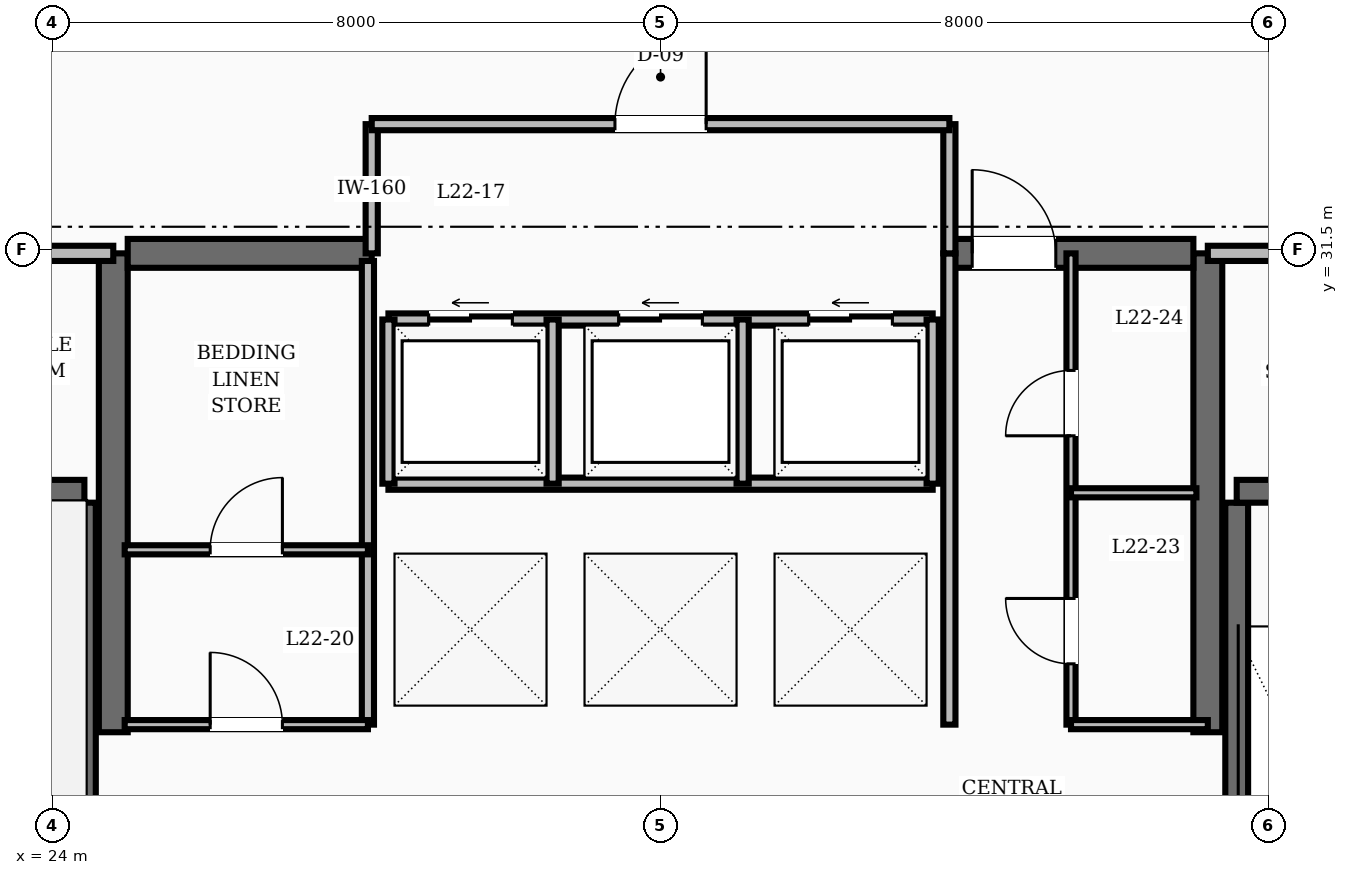
"""IFC4 building model, lengths in metres.
Left out: names, types, materials, properties, quantities, classifications, styles, units other than length and angle.
Written with IfcOpenShell. Run it as: python <this file> out.ifc"""

import sys

from ifc_helpers import new_model, si_unit, direction, frame, frame_2d, origin, place, context, subcontext, project, spatial, rectangle, extrude, element, fill, save


model = new_model("IFC4")
c1 = context("Model", 3, precision=1e-05, world=origin(), true_north=direction((0.0, 1.0)))
c2 = subcontext(c1, "Body", "Model", "MODEL_VIEW")
j1 = project(units=[si_unit("LENGTHUNIT", "METRE"), si_unit("PLANEANGLEUNIT", "RADIAN")], contexts=[c1])
p1 = place(None, origin())
s1 = spatial("IfcSite", under=j1, at=p1, CompositionType="ELEMENT")
p2 = place(p1, origin())
s2 = spatial("IfcBuilding", under=s1, at=p2, CompositionType="ELEMENT")
p3 = place(p2, frame((0.0, 0.0, 88.0)))
s3 = spatial("IfcBuildingStorey", under=s2, at=p3, CompositionType="ELEMENT", Elevation=88.0)
for number, where, z_axis, x_axis in (
    (1, (24.8, 25.15, 0.0), (0.0, 0.0, 1.0), (0.0, 1.0, 0.0)),
    (2, (39.2, 25.15, 0.0), (0.0, 0.0, 1.0), (0.0, 1.0, 0.0)),
):
    element("IfcWall", number, at=place(p3, frame(where, z_axis=z_axis, x_axis=x_axis)), inside=s3, PredefinedType="SHEAR", context=c2, shape_type="SweptSolid", body=[
        extrude(rectangle(XDim=6.3, YDim=0.38, at=frame_2d((3.15, 0.0))), origin(), (0.0, 0.0, 1.0), 3.6),
    ])
p4 = place(p3, frame((24.99, 31.45, 0.0), z_axis=(0.0, 0.0, 1.0), x_axis=(1.0, 0.0, 0.0)))
e3 = element("IfcWall", 3, at=p4, inside=s3, PredefinedType="SHEAR", context=c2, shape_type="SweptSolid", body=[
    extrude(rectangle(XDim=3.21, YDim=0.38, at=frame_2d((1.605, 0.0))), origin(), (0.0, 0.0, 1.0), 3.6),
])
p5 = place(p3, frame((35.8, 31.45, 0.0), z_axis=(0.0, 0.0, 1.0), x_axis=(1.0, 0.0, 0.0)))
e4 = element("IfcWall", 4, at=p5, inside=s3, PredefinedType="SHEAR", context=c2, shape_type="SweptSolid", body=[
    extrude(rectangle(XDim=3.21, YDim=0.38, at=frame_2d((1.605, 0.0))), origin(), (0.0, 0.0, 1.0), 3.6),
])
p6 = place(p5, frame((0.3, 0.0, 0.0)))
e5 = element("IfcOpeningElement", 5, at=p6, cuts=e4, PredefinedType="OPENING", context=c2, shape_type="SweptSolid", body=[
    extrude(rectangle(XDim=1.1, YDim=2.1, at=frame_2d((0.55, 1.05))), frame((0.0, 0.2, 0.0), z_axis=(0.0, -1.0, 0.0), x_axis=(1.0, 0.0, 0.0)), (0.0, 0.0, 1.0), 0.4),
])
p7 = place(p3, frame((24.42, 19.43, 0.0), z_axis=(0.0, 0.0, 1.0), x_axis=(0.0, 1.0, 0.0)))
e6 = element("IfcWall", 6, at=p7, inside=s3, PredefinedType="SHEAR", context=c2, shape_type="SweptSolid", body=[
    extrude(rectangle(XDim=8.74, YDim=0.3, at=frame_2d((4.37, 0.0))), origin(), (0.0, 0.0, 1.0), 3.6),
])
p8 = place(p3, frame((20.82, 28.32, 0.0), z_axis=(0.0, 0.0, 1.0), x_axis=(1.0, 0.0, 0.0)))
e7 = element("IfcWall", 7, at=p8, inside=s3, PredefinedType="SHEAR", context=c2, shape_type="SweptSolid", body=[
    extrude(rectangle(XDim=3.6, YDim=0.3, at=frame_2d((1.8, 0.0))), origin(), (0.0, 0.0, 1.0), 3.6),
])
p9 = place(p3, frame((39.58, 19.43, 0.0), z_axis=(0.0, 0.0, 1.0), x_axis=(0.0, 1.0, 0.0)))
e8 = element("IfcWall", 8, at=p9, inside=s3, PredefinedType="SHEAR", context=c2, shape_type="SweptSolid", body=[
    extrude(rectangle(XDim=8.74, YDim=0.3, at=frame_2d((4.37, 0.0))), origin(), (0.0, 0.0, 1.0), 3.6),
])
p10 = place(p3, frame((39.58, 28.32, 0.0), z_axis=(0.0, 0.0, 1.0), x_axis=(1.0, 0.0, 0.0)))
e9 = element("IfcWall", 9, at=p10, inside=s3, PredefinedType="SHEAR", context=c2, shape_type="SweptSolid", body=[
    extrude(rectangle(XDim=3.6, YDim=0.3, at=frame_2d((1.8, 0.0))), origin(), (0.0, 0.0, 1.0), 3.6),
])
p11 = place(p10, frame((1.3, 0.0, 0.0)))
e10 = element("IfcOpeningElement", 10, at=p11, cuts=e9, PredefinedType="OPENING", context=c2, shape_type="SweptSolid", body=[
    extrude(rectangle(XDim=1.1, YDim=2.1, at=frame_2d((0.55, 1.05))), frame((0.0, 0.16, 0.0), z_axis=(0.0, -1.0, 0.0), x_axis=(1.0, 0.0, 0.0)), (0.0, 0.0, 1.0), 0.32),
])
for number, where, z_axis, x_axis in (
    (11, (39.2, 31.45, 0.0), (0.0, 0.0, 1.0), (1.0, 0.0, 0.0)),
    (12, (20.82, 31.45, 0.0), (0.0, 0.0, 1.0), (1.0, 0.0, 0.0)),
):
    element("IfcWall", number, at=place(p3, frame(where, z_axis=z_axis, x_axis=x_axis)), inside=s3, PredefinedType="SOLIDWALL", context=c2, shape_type="SweptSolid", body=[
        extrude(rectangle(XDim=3.98, YDim=0.2, at=frame_2d((1.99, 0.0))), origin(), (0.0, 0.0, 1.0), 2.71),
    ])
p12 = place(p3, frame((35.8, 25.25, 0.0), z_axis=(0.0, 0.0, 1.0), x_axis=(0.0, 1.0, 0.0)))
e13 = element("IfcWall", 13, at=p12, inside=s3, PredefinedType="SOLIDWALL", context=c2, shape_type="SweptSolid", body=[
    extrude(rectangle(XDim=6.2, YDim=0.16, at=frame_2d((3.1, 0.0))), origin(), (0.0, 0.0, 1.0), 2.71),
])
p13 = place(p3, frame((28.42, 30.58, 0.0), z_axis=(0.0, 0.0, 1.0), x_axis=(1.0, 0.0, 0.0)))
e14 = element("IfcWall", 14, at=p13, inside=s3, PredefinedType="SOLIDWALL", context=c2, shape_type="SweptSolid", body=[
    extrude(rectangle(XDim=7.16, YDim=0.16, at=frame_2d((3.58, 0.0))), origin(), (0.0, 0.0, 1.0), 2.71),
])
p14 = place(p13, frame((0.53, 0.0, 0.0)))
e15 = element("IfcOpeningElement", 15, at=p14, cuts=e14, PredefinedType="OPENING", context=c2, shape_type="SweptSolid", body=[
    extrude(rectangle(XDim=1.1, YDim=2.15, at=frame_2d((0.55, 1.075))), frame((0.0, 0.09, 0.0), z_axis=(0.0, -1.0, 0.0), x_axis=(1.0, 0.0, 0.0)), (0.0, 0.0, 1.0), 0.18),
])
p15 = place(p13, frame((3.03, 0.0, 0.0)))
e16 = element("IfcOpeningElement", 16, at=p15, cuts=e14, PredefinedType="OPENING", context=c2, shape_type="SweptSolid", body=[
    extrude(rectangle(XDim=1.1, YDim=2.15, at=frame_2d((0.55, 1.075))), frame((0.0, 0.09, 0.0), z_axis=(0.0, -1.0, 0.0), x_axis=(1.0, 0.0, 0.0)), (0.0, 0.0, 1.0), 0.18),
])
p16 = place(p13, frame((5.53, 0.0, 0.0)))
e17 = element("IfcOpeningElement", 17, at=p16, cuts=e14, PredefinedType="OPENING", context=c2, shape_type="SweptSolid", body=[
    extrude(rectangle(XDim=1.1, YDim=2.15, at=frame_2d((0.55, 1.075))), frame((0.0, 0.09, 0.0), z_axis=(0.0, -1.0, 0.0), x_axis=(1.0, 0.0, 0.0)), (0.0, 0.0, 1.0), 0.18),
])
p17 = place(p3, frame((28.42, 28.42, 0.0), z_axis=(0.0, 0.0, 1.0), x_axis=(1.0, 0.0, 0.0)))
e18 = element("IfcWall", 18, at=p17, inside=s3, PredefinedType="SOLIDWALL", context=c2, shape_type="SweptSolid", body=[
    extrude(rectangle(XDim=7.16, YDim=0.16, at=frame_2d((3.58, 0.0))), origin(), (0.0, 0.0, 1.0), 2.71),
])
for number, where, z_axis, x_axis in (
    (19, (28.42, 28.42, 0.0), (0.0, 0.0, 1.0), (0.0, 1.0, 0.0)),
    (20, (30.58, 28.42, 0.0), (0.0, 0.0, 1.0), (0.0, 1.0, 0.0)),
    (21, (33.08, 28.42, 0.0), (0.0, 0.0, 1.0), (0.0, 1.0, 0.0)),
    (22, (35.58, 28.42, 0.0), (0.0, 0.0, 1.0), (0.0, 1.0, 0.0)),
):
    element("IfcWall", number, at=place(p3, frame(where, z_axis=z_axis, x_axis=x_axis)), inside=s3, PredefinedType="SOLIDWALL", context=c2, shape_type="SweptSolid", body=[
        extrude(rectangle(XDim=2.16, YDim=0.16, at=frame_2d((1.08, 0.0))), origin(), (0.0, 0.0, 1.0), 2.71),
    ])
for number, where, z_axis, x_axis in (
    (23, (28.2, 31.45, 0.0), (0.0, 0.0, 1.0), (0.0, 1.0, 0.0)),
    (24, (35.8, 31.45, 0.0), (0.0, 0.0, 1.0), (0.0, 1.0, 0.0)),
):
    element("IfcWall", number, at=place(p3, frame(where, z_axis=z_axis, x_axis=x_axis)), inside=s3, PredefinedType="SOLIDWALL", context=c2, shape_type="SweptSolid", body=[
        extrude(rectangle(XDim=1.7, YDim=0.16, at=frame_2d((0.85, 0.0))), origin(), (0.0, 0.0, 1.0), 2.71),
    ])
p18 = place(p3, frame((28.2, 33.15, 0.0), z_axis=(0.0, 0.0, 1.0), x_axis=(1.0, 0.0, 0.0)))
e25 = element("IfcWall", 25, at=p18, inside=s3, PredefinedType="SOLIDWALL", context=c2, shape_type="SweptSolid", body=[
    extrude(rectangle(XDim=7.6, YDim=0.16, at=frame_2d((3.8, 0.0))), origin(), (0.0, 0.0, 1.0), 2.71),
])
p19 = place(p18, frame((3.2, 0.0, 0.0)))
e26 = element("IfcOpeningElement", 26, at=p19, cuts=e25, PredefinedType="OPENING", context=c2, shape_type="SweptSolid", body=[
    extrude(rectangle(XDim=1.2, YDim=2.1, at=frame_2d((0.6, 1.05))), frame((0.0, 0.09, 0.0), z_axis=(0.0, -1.0, 0.0), x_axis=(1.0, 0.0, 0.0)), (0.0, 0.0, 1.0), 0.18),
])
p20 = place(p3, frame((28.15, 25.25, 0.0), z_axis=(0.0, 0.0, 1.0), x_axis=(0.0, 1.0, 0.0)))
e27 = element("IfcWall", 27, at=p20, inside=s3, PredefinedType="SOLIDWALL", context=c2, shape_type="SweptSolid", body=[
    extrude(rectangle(XDim=6.1, YDim=0.16, at=frame_2d((3.05, 0.0))), origin(), (0.0, 0.0, 1.0), 2.71),
])
p21 = place(p3, frame((24.95, 25.25, 0.0), z_axis=(0.0, 0.0, 1.0), x_axis=(1.0, 0.0, 0.0)))
e28 = element("IfcWall", 28, at=p21, inside=s3, PredefinedType="PARTITIONING", context=c2, shape_type="SweptSolid", body=[
    extrude(rectangle(XDim=3.2, YDim=0.12, at=frame_2d((1.6, 0.0))), origin(), (0.0, 0.0, 1.0), 2.71),
])
p22 = place(p21, frame((1.125, 0.0, 0.0)))
e29 = element("IfcOpeningElement", 29, at=p22, cuts=e28, PredefinedType="OPENING", context=c2, shape_type="SweptSolid", body=[
    extrude(rectangle(XDim=0.95, YDim=2.1, at=frame_2d((0.475, 1.05))), frame((0.0, 0.07, 0.0), z_axis=(0.0, -1.0, 0.0), x_axis=(1.0, 0.0, 0.0)), (0.0, 0.0, 1.0), 0.14),
])
p23 = place(p3, frame((37.4, 25.25, 0.0), z_axis=(0.0, 0.0, 1.0), x_axis=(0.0, 1.0, 0.0)))
e30 = element("IfcWall", 30, at=p23, inside=s3, PredefinedType="PARTITIONING", context=c2, shape_type="SweptSolid", body=[
    extrude(rectangle(XDim=6.2, YDim=0.12, at=frame_2d((3.1, 0.0))), origin(), (0.0, 0.0, 1.0), 2.71),
])
p24 = place(p23, frame((0.8, 0.0, 0.0)))
e31 = element("IfcOpeningElement", 31, at=p24, cuts=e30, PredefinedType="OPENING", context=c2, shape_type="SweptSolid", body=[
    extrude(rectangle(XDim=0.86, YDim=2.1, at=frame_2d((0.43, 1.05))), frame((0.0, 0.07, 0.0), z_axis=(0.0, -1.0, 0.0), x_axis=(1.0, 0.0, 0.0)), (0.0, 0.0, 1.0), 0.14),
])
p25 = place(p23, frame((3.8, 0.0, 0.0)))
e32 = element("IfcOpeningElement", 32, at=p25, cuts=e30, PredefinedType="OPENING", context=c2, shape_type="SweptSolid", body=[
    extrude(rectangle(XDim=0.86, YDim=2.1, at=frame_2d((0.43, 1.05))), frame((0.0, 0.07, 0.0), z_axis=(0.0, -1.0, 0.0), x_axis=(1.0, 0.0, 0.0)), (0.0, 0.0, 1.0), 0.14),
])
p26 = place(p3, frame((37.4, 25.25, 0.0), z_axis=(0.0, 0.0, 1.0), x_axis=(1.0, 0.0, 0.0)))
e33 = element("IfcWall", 33, at=p26, inside=s3, PredefinedType="PARTITIONING", context=c2, shape_type="SweptSolid", body=[
    extrude(rectangle(XDim=1.8, YDim=0.12, at=frame_2d((0.9, 0.0))), origin(), (0.0, 0.0, 1.0), 2.71),
])
p27 = place(p3, frame((24.95, 27.55, 0.0), z_axis=(0.0, 0.0, 1.0), x_axis=(1.0, 0.0, 0.0)))
e34 = element("IfcWall", 34, at=p27, inside=s3, PredefinedType="PARTITIONING", context=c2, shape_type="SweptSolid", body=[
    extrude(rectangle(XDim=3.2, YDim=0.12, at=frame_2d((1.6, 0.0))), origin(), (0.0, 0.0, 1.0), 2.71),
])
p28 = place(p27, frame((1.125, 0.0, 0.0)))
e35 = element("IfcOpeningElement", 35, at=p28, cuts=e34, PredefinedType="OPENING", context=c2, shape_type="SweptSolid", body=[
    extrude(rectangle(XDim=0.95, YDim=2.1, at=frame_2d((0.475, 1.05))), frame((0.0, 0.07, 0.0), z_axis=(0.0, -1.0, 0.0), x_axis=(1.0, 0.0, 0.0)), (0.0, 0.0, 1.0), 0.14),
])
p29 = place(p3, frame((37.4, 28.3, 0.0), z_axis=(0.0, 0.0, 1.0), x_axis=(1.0, 0.0, 0.0)))
e36 = element("IfcWall", 36, at=p29, inside=s3, PredefinedType="PARTITIONING", context=c2, shape_type="SweptSolid", body=[
    extrude(rectangle(XDim=1.65, YDim=0.12, at=frame_2d((0.825, 0.0))), origin(), (0.0, 0.0, 1.0), 2.71),
])
p30 = place(p6, origin())
e37 = element("IfcDoor", 37, at=p30, inside=s3, OperationType="SINGLE_SWING_LEFT", PredefinedType="DOOR", context=c2, shape_type="SweptSolid", body=[
    extrude(rectangle(XDim=1.1, YDim=2.1, at=frame_2d((0.55, 1.05))), frame((0.0, 0.025, 0.0), z_axis=(0.0, -1.0, 0.0), x_axis=(1.0, 0.0, 0.0)), (0.0, 0.0, 1.0), 0.05),
])
fill(e5, e37)
p31 = place(p14, origin())
e38 = element("IfcDoor", 38, at=p31, inside=s3, OperationType="SLIDING_TO_LEFT", PredefinedType="DOOR", context=c2, shape_type="SweptSolid", body=[
    extrude(rectangle(XDim=1.1, YDim=2.15, at=frame_2d((0.55, 1.075))), frame((0.0, 0.025, 0.0), z_axis=(0.0, -1.0, 0.0), x_axis=(1.0, 0.0, 0.0)), (0.0, 0.0, 1.0), 0.05),
])
fill(e15, e38)
p32 = place(p15, origin())
e39 = element("IfcDoor", 39, at=p32, inside=s3, OperationType="SLIDING_TO_LEFT", PredefinedType="DOOR", context=c2, shape_type="SweptSolid", body=[
    extrude(rectangle(XDim=1.1, YDim=2.15, at=frame_2d((0.55, 1.075))), frame((0.0, 0.025, 0.0), z_axis=(0.0, -1.0, 0.0), x_axis=(1.0, 0.0, 0.0)), (0.0, 0.0, 1.0), 0.05),
])
fill(e16, e39)
p33 = place(p16, origin())
e40 = element("IfcDoor", 40, at=p33, inside=s3, OperationType="SLIDING_TO_LEFT", PredefinedType="DOOR", context=c2, shape_type="SweptSolid", body=[
    extrude(rectangle(XDim=1.1, YDim=2.15, at=frame_2d((0.55, 1.075))), frame((0.0, 0.025, 0.0), z_axis=(0.0, -1.0, 0.0), x_axis=(1.0, 0.0, 0.0)), (0.0, 0.0, 1.0), 0.05),
])
fill(e17, e40)
p34 = place(p19, origin())
e41 = element("IfcDoor", 41, at=p34, inside=s3, OperationType="SINGLE_SWING_RIGHT", PredefinedType="DOOR", context=c2, shape_type="SweptSolid", body=[
    extrude(rectangle(XDim=1.2, YDim=2.1, at=frame_2d((0.6, 1.05))), frame((0.0, 0.025, 0.0), z_axis=(0.0, -1.0, 0.0), x_axis=(1.0, 0.0, 0.0)), (0.0, 0.0, 1.0), 0.05),
])
fill(e26, e41)
p35 = place(p22, origin())
e42 = element("IfcDoor", 42, at=p35, inside=s3, OperationType="SINGLE_SWING_LEFT", PredefinedType="DOOR", context=c2, shape_type="SweptSolid", body=[
    extrude(rectangle(XDim=0.95, YDim=2.1, at=frame_2d((0.475, 1.05))), frame((0.0, 0.025, 0.0), z_axis=(0.0, -1.0, 0.0), x_axis=(1.0, 0.0, 0.0)), (0.0, 0.0, 1.0), 0.05),
])
fill(e29, e42)
p36 = place(p28, origin())
e43 = element("IfcDoor", 43, at=p36, inside=s3, OperationType="SINGLE_SWING_RIGHT", PredefinedType="DOOR", context=c2, shape_type="SweptSolid", body=[
    extrude(rectangle(XDim=0.95, YDim=2.1, at=frame_2d((0.475, 1.05))), frame((0.0, 0.025, 0.0), z_axis=(0.0, -1.0, 0.0), x_axis=(1.0, 0.0, 0.0)), (0.0, 0.0, 1.0), 0.05),
])
fill(e35, e43)
p37 = place(p24, origin())
e44 = element("IfcDoor", 44, at=p37, inside=s3, OperationType="SINGLE_SWING_RIGHT", PredefinedType="DOOR", context=c2, shape_type="SweptSolid", body=[
    extrude(rectangle(XDim=0.86, YDim=2.1, at=frame_2d((0.43, 1.05))), frame((0.0, 0.025, 0.0), z_axis=(0.0, -1.0, 0.0), x_axis=(1.0, 0.0, 0.0)), (0.0, 0.0, 1.0), 0.05),
])
fill(e31, e44)
p38 = place(p25, origin())
e45 = element("IfcDoor", 45, at=p38, inside=s3, OperationType="SINGLE_SWING_LEFT", PredefinedType="DOOR", context=c2, shape_type="SweptSolid", body=[
    extrude(rectangle(XDim=0.86, YDim=2.1, at=frame_2d((0.43, 1.05))), frame((0.0, 0.025, 0.0), z_axis=(0.0, -1.0, 0.0), x_axis=(1.0, 0.0, 0.0)), (0.0, 0.0, 1.0), 0.05),
])
fill(e32, e45)
save(model, sys.argv[1])
